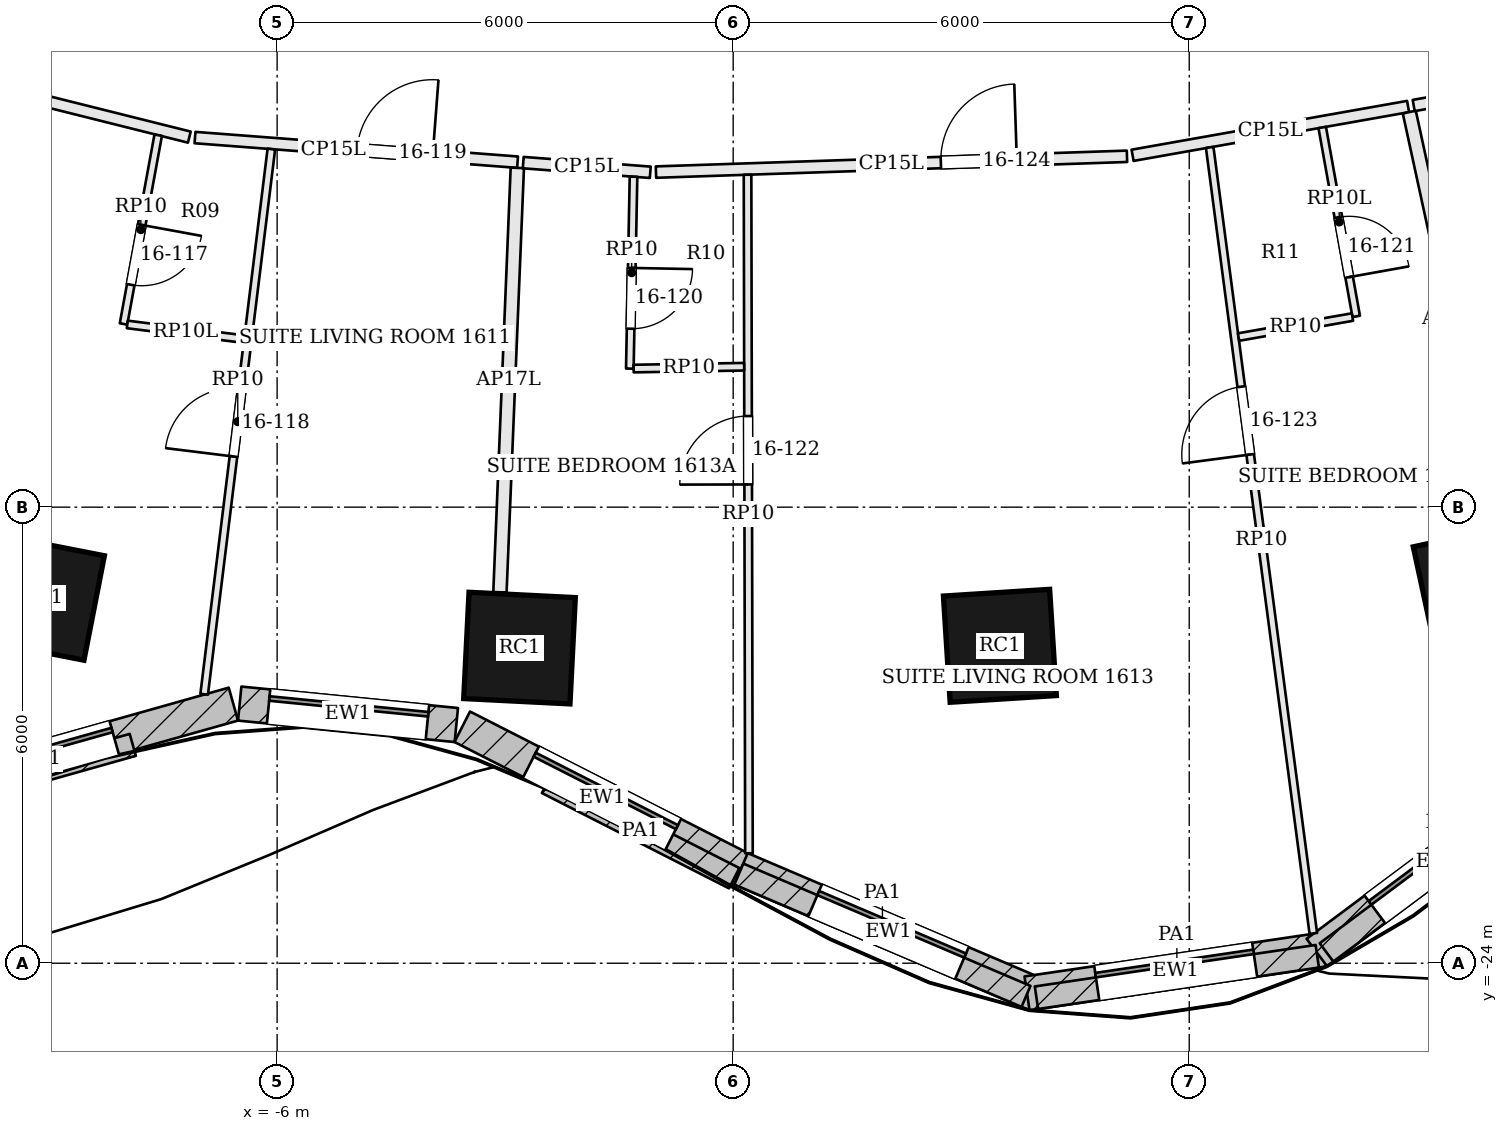
"""IFC4 building model, lengths in metres.
Left out: names, types, materials, properties, quantities, classifications, styles, units other than length and angle.
Written with IfcOpenShell. Run it as: python <this file> out.ifc"""

import sys

from ifc_helpers import new_model, si_unit, direction, frame, frame_2d, origin, origin_2d, place, context, subcontext, project, spatial, rectangle, extrude, element, fill, save


model = new_model("IFC4")
c1 = context("Model", 3, precision=1e-05, world=origin(), true_north=direction((0.0, 1.0)))
c2 = subcontext(c1, "Body", "Model", "MODEL_VIEW")
j1 = project(units=[si_unit("LENGTHUNIT", "METRE"), si_unit("PLANEANGLEUNIT", "RADIAN")], contexts=[c1])
p1 = place(None, origin())
s1 = spatial("IfcSite", under=j1, at=p1, CompositionType="ELEMENT")
p2 = place(p1, origin())
s2 = spatial("IfcBuilding", under=s1, at=p2, CompositionType="ELEMENT")
p3 = place(p2, frame((0.0, 0.0, 73.5)))
s3 = spatial("IfcBuildingStorey", under=s2, at=p3, CompositionType="ELEMENT", Elevation=73.5)
for number, where, z_axis, x_axis in (
    (1, (-9.094, -19.192, 0.0), (0.0, 0.0, 1.0), (0.981, -0.192, 0.0)),
    (2, (-2.811, -19.854, 0.0), (0.0, 0.0, 1.0), (0.999, -0.05, 0.0)),
    (3, (3.509, -19.824, 0.0), (0.0, 0.0, 1.0), (0.998, 0.063, 0.0)),
    (4, (9.78, -19.058, 0.0), (0.0, 0.0, 1.0), (0.977, 0.211, 0.0)),
):
    element("IfcColumn", number, at=place(p3, frame(where, z_axis=z_axis, x_axis=x_axis)), inside=s3, PredefinedType="COLUMN", context=c2, shape_type="SweptSolid", body=[
        extrude(rectangle(XDim=1.4, YDim=1.4, at=origin_2d()), origin(), (0.0, 0.0, 1.0), 2.8),
    ])
p4 = place(p3, frame((-11.732, -22.044, 0.0), z_axis=(0.0, 0.0, 1.0), x_axis=(0.962535416232, 0.271155992925, 0.0)))
e5 = element("IfcWall", 5, at=p4, inside=s3, PredefinedType="SOLIDWALL", context=c2, shape_type="SweptSolid", body=[
    extrude(rectangle(XDim=5.357, YDim=0.45, at=frame_2d((2.679, 0.0))), origin(), (0.0, 0.0, 1.0), 3.3),
])
p5 = place(p4, frame((1.629, 0.0, 0.9)))
e6 = element("IfcOpeningElement", 6, at=p5, cuts=e5, PredefinedType="OPENING", context=c2, shape_type="SweptSolid", body=[
    extrude(rectangle(XDim=2.1, YDim=1.8, at=frame_2d((1.05, 0.9))), frame((0.0, 0.235, 0.0), z_axis=(0.0, -1.0, 0.0), x_axis=(1.0, 0.0, 0.0)), (0.0, 0.0, 1.0), 0.47),
])
p6 = place(p3, frame((-6.492, -20.584, 0.0), z_axis=(0.0, 0.0, 1.0), x_axis=(0.995123748575, -0.098634299418, 0.0)))
e7 = element("IfcWall", 7, at=p6, inside=s3, PredefinedType="SOLIDWALL", context=c2, shape_type="SweptSolid", body=[
    extrude(rectangle(XDim=2.864, YDim=0.45, at=frame_2d((1.432, 0.0))), origin(), (0.0, 0.0, 1.0), 3.3),
])
p7 = place(p6, frame((0.382, 0.0, 0.9)))
e8 = element("IfcOpeningElement", 8, at=p7, cuts=e7, PredefinedType="OPENING", context=c2, shape_type="SweptSolid", body=[
    extrude(rectangle(XDim=2.1, YDim=1.8, at=frame_2d((1.05, 0.9))), frame((0.0, 0.235, 0.0), z_axis=(0.0, -1.0, 0.0), x_axis=(1.0, 0.0, 0.0)), (0.0, 0.0, 1.0), 0.47),
])
p8 = place(p3, frame((-3.564, -20.889, 0.0), z_axis=(0.0, 0.0, 1.0), x_axis=(0.891033634447, -0.453937288933, 0.0)))
e9 = element("IfcWall", 9, at=p8, inside=s3, PredefinedType="SOLIDWALL", context=c2, shape_type="SweptSolid", body=[
    extrude(rectangle(XDim=4.132, YDim=0.45, at=frame_2d((2.066, 0.0))), origin(), (0.0, 0.0, 1.0), 3.3),
])
p9 = place(p8, frame((1.016, 0.0, 0.9)))
e10 = element("IfcOpeningElement", 10, at=p9, cuts=e9, PredefinedType="OPENING", context=c2, shape_type="SweptSolid", body=[
    extrude(rectangle(XDim=2.1, YDim=1.8, at=frame_2d((1.05, 0.9))), frame((0.0, 0.235, 0.0), z_axis=(0.0, -1.0, 0.0), x_axis=(1.0, 0.0, 0.0)), (0.0, 0.0, 1.0), 0.47),
])
p10 = place(p3, frame((0.103, -22.758, 0.0), z_axis=(0.0, 0.0, 1.0), x_axis=(0.920037498786, -0.391830321475, 0.0)))
e11 = element("IfcWall", 11, at=p10, inside=s3, PredefinedType="SOLIDWALL", context=c2, shape_type="SweptSolid", body=[
    extrude(rectangle(XDim=4.219, YDim=0.45, at=frame_2d((2.11, 0.0))), origin(), (0.0, 0.0, 1.0), 3.3),
])
p11 = place(p10, frame((1.06, 0.0, 0.9)))
e12 = element("IfcOpeningElement", 12, at=p11, cuts=e11, PredefinedType="OPENING", context=c2, shape_type="SweptSolid", body=[
    extrude(rectangle(XDim=2.1, YDim=1.8, at=frame_2d((1.05, 0.9))), frame((0.0, 0.235, 0.0), z_axis=(0.0, -1.0, 0.0), x_axis=(1.0, 0.0, 0.0)), (0.0, 0.0, 1.0), 0.47),
])
p12 = place(p3, frame((3.866, -24.396, 0.0), z_axis=(0.0, 0.0, 1.0), x_axis=(0.989255112942, 0.146199594798, 0.0)))
e13 = element("IfcWall", 13, at=p12, inside=s3, PredefinedType="SOLIDWALL", context=c2, shape_type="SweptSolid", body=[
    extrude(rectangle(XDim=3.954, YDim=0.45, at=frame_2d((1.977, 0.0))), origin(), (0.0, 0.0, 1.0), 3.3),
])
p13 = place(p12, frame((0.927, 0.0, 0.9)))
e14 = element("IfcOpeningElement", 14, at=p13, cuts=e13, PredefinedType="OPENING", context=c2, shape_type="SweptSolid", body=[
    extrude(rectangle(XDim=2.1, YDim=1.8, at=frame_2d((1.05, 0.9))), frame((0.0, 0.235, 0.0), z_axis=(0.0, -1.0, 0.0), x_axis=(1.0, 0.0, 0.0)), (0.0, 0.0, 1.0), 0.47),
])
p14 = place(p3, frame((7.678, -23.859, 0.0), z_axis=(0.0, 0.0, 1.0), x_axis=(0.801665619573, 0.597772728046, 0.0)))
e15 = element("IfcWall", 15, at=p14, inside=s3, PredefinedType="SOLIDWALL", context=c2, shape_type="SweptSolid", body=[
    extrude(rectangle(XDim=4.003, YDim=0.45, at=frame_2d((2.001, 0.0))), origin(), (0.0, 0.0, 1.0), 3.3),
])
p15 = place(p14, frame((0.951, 0.0, 0.9)))
e16 = element("IfcOpeningElement", 16, at=p15, cuts=e15, PredefinedType="OPENING", context=c2, shape_type="SweptSolid", body=[
    extrude(rectangle(XDim=2.1, YDim=1.8, at=frame_2d((1.05, 0.9))), frame((0.0, 0.235, 0.0), z_axis=(0.0, -1.0, 0.0), x_axis=(1.0, 0.0, 0.0)), (0.0, 0.0, 1.0), 0.47),
])
p16 = place(p3, frame((-11.314, -22.089, 3.6), z_axis=(0.0, 0.0, 1.0), x_axis=(0.962527541074, 0.271183946195, 0.0)))
e17 = element("IfcWall", 17, at=p16, inside=s3, PredefinedType="PARAPET", context=c2, shape_type="SweptSolid", body=[
    extrude(rectangle(XDim=3.548, YDim=0.3, at=frame_2d((1.774, 0.0))), origin(), (0.0, 0.0, 1.0), 1.1),
])
p17 = place(p3, frame((-2.448, -21.627, 3.6), z_axis=(0.0, 0.0, 1.0), x_axis=(0.891061751317, -0.453882094095, 0.0)))
e18 = element("IfcWall", 18, at=p17, inside=s3, PredefinedType="PARAPET", context=c2, shape_type="SweptSolid", body=[
    extrude(rectangle(XDim=2.763, YDim=0.3, at=frame_2d((1.381, 0.0))), origin(), (0.0, 0.0, 1.0), 1.1),
])
p18 = place(p3, frame((0.075, -22.827, 3.6), z_axis=(0.0, 0.0, 1.0), x_axis=(0.920031521407, -0.391844356367, 0.0)))
e19 = element("IfcWall", 19, at=p18, inside=s3, PredefinedType="PARAPET", context=c2, shape_type="SweptSolid", body=[
    extrude(rectangle(XDim=4.106, YDim=0.3, at=frame_2d((2.053, 0.0))), origin(), (0.0, 0.0, 1.0), 1.1),
])
p19 = place(p3, frame((3.99, -24.454, 3.6), z_axis=(0.0, 0.0, 1.0), x_axis=(0.989258150551, 0.146179039429, 0.0)))
e20 = element("IfcWall", 20, at=p19, inside=s3, PredefinedType="PARAPET", context=c2, shape_type="SweptSolid", body=[
    extrude(rectangle(XDim=3.734, YDim=0.3, at=frame_2d((1.867, 0.0))), origin(), (0.0, 0.0, 1.0), 1.1),
])
p20 = place(p3, frame((7.806, -23.858, 3.6), z_axis=(0.0, 0.0, 1.0), x_axis=(0.801649538596, 0.597794293439, 0.0)))
e21 = element("IfcWall", 21, at=p20, inside=s3, PredefinedType="PARAPET", context=c2, shape_type="SweptSolid", body=[
    extrude(rectangle(XDim=3.865, YDim=0.3, at=frame_2d((1.932, 0.0))), origin(), (0.0, 0.0, 1.0), 1.1),
])
p21 = place(p3, frame((-11.898, -11.945, 0.0), z_axis=(0.0, 0.0, 1.0), x_axis=(0.970083727867, -0.24277059321, 0.0)))
e22 = element("IfcWall", 22, at=p21, inside=s3, PredefinedType="PARTITIONING", context=c2, shape_type="SweptSolid", body=[
    extrude(rectangle(XDim=4.889, YDim=0.15, at=frame_2d((2.445, 0.0))), origin(), (0.0, 0.0, 1.0), 2.58),
])
p22 = place(p3, frame((-7.08, -13.137, 0.0), z_axis=(0.0, 0.0, 1.0), x_axis=(0.997102544245, -0.07606915446, 0.0)))
e23 = element("IfcWall", 23, at=p22, inside=s3, PredefinedType="PARTITIONING", context=c2, shape_type="SweptSolid", body=[
    extrude(rectangle(XDim=4.256, YDim=0.15, at=frame_2d((2.128, 0.0))), origin(), (0.0, 0.0, 1.0), 2.58),
])
p23 = place(p22, frame((2.136, 0.0, 0.0)))
e24 = element("IfcOpeningElement", 24, at=p23, cuts=e23, PredefinedType="OPENING", context=c2, shape_type="SweptSolid", body=[
    extrude(rectangle(XDim=1.0, YDim=2.1, at=frame_2d((0.5, 1.05))), frame((0.0, 0.085, 0.0), z_axis=(0.0, -1.0, 0.0), x_axis=(1.0, 0.0, 0.0)), (0.0, 0.0, 1.0), 0.17),
])
p24 = place(p3, frame((-3.069, -19.12, 0.0), z_axis=(0.0, 0.0, 1.0), x_axis=(0.04093278692, 0.999161902274, 0.0)))
e25 = element("IfcWall", 25, at=p24, inside=s3, PredefinedType="PARTITIONING", context=c2, shape_type="SweptSolid", body=[
    extrude(rectangle(XDim=5.589, YDim=0.175, at=frame_2d((2.794, 0.0))), origin(), (0.0, 0.0, 1.0), 2.28),
])
p25 = place(p3, frame((-2.762, -13.467, 0.0), z_axis=(0.0, 0.0, 1.0), x_axis=(0.9971056667, -0.076028214726, 0.0)))
e26 = element("IfcWall", 26, at=p25, inside=s3, PredefinedType="PARTITIONING", context=c2, shape_type="SweptSolid", body=[
    extrude(rectangle(XDim=1.676, YDim=0.15, at=frame_2d((0.838, 0.0))), origin(), (0.0, 0.0, 1.0), 2.58),
])
p26 = place(p3, frame((-1.016, -13.592, 0.0), z_axis=(0.0, 0.0, 1.0), x_axis=(0.999437056395, 0.033549520194, 0.0)))
e27 = element("IfcWall", 27, at=p26, inside=s3, PredefinedType="PARTITIONING", context=c2, shape_type="SweptSolid", body=[
    extrude(rectangle(XDim=6.2, YDim=0.15, at=frame_2d((3.1, 0.0))), origin(), (0.0, 0.0, 1.0), 2.58),
])
p27 = place(p26, frame((3.75, 0.0, 0.0)))
e28 = element("IfcOpeningElement", 28, at=p27, cuts=e27, PredefinedType="OPENING", context=c2, shape_type="SweptSolid", body=[
    extrude(rectangle(XDim=1.0, YDim=2.1, at=frame_2d((0.5, 1.05))), frame((0.0, 0.085, 0.0), z_axis=(0.0, -1.0, 0.0), x_axis=(1.0, 0.0, 0.0)), (0.0, 0.0, 1.0), 0.17),
])
p28 = place(p3, frame((5.255, -13.371, 0.0), z_axis=(0.0, 0.0, 1.0), x_axis=(0.984677871603, 0.174383167696, 0.0)))
e29 = element("IfcWall", 29, at=p28, inside=s3, PredefinedType="PARTITIONING", context=c2, shape_type="SweptSolid", body=[
    extrude(rectangle(XDim=3.681, YDim=0.15, at=frame_2d((1.84, 0.0))), origin(), (0.0, 0.0, 1.0), 2.58),
])
p29 = place(p3, frame((10.081, -18.256, 0.0), z_axis=(0.0, 0.0, 1.0), x_axis=(-0.212542235069, 0.977151880882, 0.0)))
e30 = element("IfcWall", 30, at=p29, inside=s3, PredefinedType="PARTITIONING", context=c2, shape_type="SweptSolid", body=[
    extrude(rectangle(XDim=5.581, YDim=0.175, at=frame_2d((2.791, 0.0))), origin(), (0.0, 0.0, 1.0), 2.28),
])
p30 = place(p3, frame((8.953, -12.716, 0.0), z_axis=(0.0, 0.0, 1.0), x_axis=(0.984678178819, 0.17438143295, 0.0)))
e31 = element("IfcWall", 31, at=p30, inside=s3, PredefinedType="PARTITIONING", context=c2, shape_type="SweptSolid", body=[
    extrude(rectangle(XDim=1.121, YDim=0.15, at=frame_2d((0.561, 0.0))), origin(), (0.0, 0.0, 1.0), 2.684),
])
p31 = place(p3, frame((-6.96, -20.462, 0.0), z_axis=(0.0, 0.0, 1.0), x_axis=(0.122329787854, 0.992489507755, 0.0)))
e32 = element("IfcWall", 32, at=p31, inside=s3, PredefinedType="PARTITIONING", context=c2, shape_type="SweptSolid", body=[
    extrude(rectangle(XDim=7.227, YDim=0.1, at=frame_2d((3.613, 0.0))), origin(), (0.0, 0.0, 1.0), 2.784),
])
p32 = place(p31, frame((3.152, 0.0, 0.0)))
e33 = element("IfcOpeningElement", 33, at=p32, cuts=e32, PredefinedType="OPENING", context=c2, shape_type="SweptSolid", body=[
    extrude(rectangle(XDim=0.9, YDim=2.4, at=frame_2d((0.45, 1.2))), frame((0.0, 0.06, 0.0), z_axis=(0.0, -1.0, 0.0), x_axis=(1.0, 0.0, 0.0)), (0.0, 0.0, 1.0), 0.12),
])
p33 = place(p3, frame((-7.565, -13.106, 0.0), z_axis=(0.0, 0.0, 1.0), x_axis=(-0.180527437527, -0.98356994886, 0.0)))
e34 = element("IfcWall", 34, at=p33, inside=s3, PredefinedType="PARTITIONING", context=c2, shape_type="SweptSolid", body=[
    extrude(rectangle(XDim=2.525, YDim=0.1, at=frame_2d((1.262, 0.0))), origin(), (0.0, 0.0, 1.0), 2.784),
])
p34 = place(p33, frame((1.2, 0.0, 0.0)))
e35 = element("IfcOpeningElement", 35, at=p34, cuts=e34, PredefinedType="OPENING", context=c2, shape_type="SweptSolid", body=[
    extrude(rectangle(XDim=0.8, YDim=2.1, at=frame_2d((0.4, 1.05))), frame((0.0, 0.06, 0.0), z_axis=(0.0, -1.0, 0.0), x_axis=(1.0, 0.0, 0.0)), (0.0, 0.0, 1.0), 0.12),
])
p35 = place(p3, frame((-7.971, -15.596, 0.0), z_axis=(0.0, 0.0, 1.0), x_axis=(0.992197649384, -0.124674875403, 0.0)))
e36 = element("IfcWall", 36, at=p35, inside=s3, PredefinedType="PARTITIONING", context=c2, shape_type="SweptSolid", body=[
    extrude(rectangle(XDim=1.549, YDim=0.1, at=frame_2d((0.774, 0.0))), origin(), (0.0, 0.0, 1.0), 2.58),
])
p36 = place(p3, frame((0.208, -22.553, 0.0), z_axis=(0.0, 0.0, 1.0), x_axis=(-0.002051193584, 0.9999978963, 0.0)))
e37 = element("IfcWall", 37, at=p36, inside=s3, PredefinedType="PARTITIONING", context=c2, shape_type="SweptSolid", body=[
    extrude(rectangle(XDim=8.927, YDim=0.1, at=frame_2d((4.463, 0.0))), origin(), (0.0, 0.0, 1.0), 2.784),
])
p37 = place(p36, frame((4.852, 0.0, 0.0)))
e38 = element("IfcOpeningElement", 38, at=p37, cuts=e37, PredefinedType="OPENING", context=c2, shape_type="SweptSolid", body=[
    extrude(rectangle(XDim=0.9, YDim=2.4, at=frame_2d((0.45, 1.2))), frame((0.0, 0.06, 0.0), z_axis=(0.0, -1.0, 0.0), x_axis=(1.0, 0.0, 0.0)), (0.0, 0.0, 1.0), 0.12),
])
p38 = place(p3, frame((7.633, -23.608, 0.0), z_axis=(0.0, 0.0, 1.0), x_axis=(-0.13070700248, 0.991421040478, 0.0)))
e39 = element("IfcWall", 39, at=p38, inside=s3, PredefinedType="PARTITIONING", context=c2, shape_type="SweptSolid", body=[
    extrude(rectangle(XDim=10.43, YDim=0.1, at=frame_2d((5.215, 0.0))), origin(), (0.0, 0.0, 1.0), 2.784),
])
p39 = place(p38, frame((6.355, 0.0, 0.0)))
e40 = element("IfcOpeningElement", 40, at=p39, cuts=e39, PredefinedType="OPENING", context=c2, shape_type="SweptSolid", body=[
    extrude(rectangle(XDim=0.9, YDim=2.4, at=frame_2d((0.45, 1.2))), frame((0.0, 0.06, 0.0), z_axis=(0.0, -1.0, 0.0), x_axis=(1.0, 0.0, 0.0)), (0.0, 0.0, 1.0), 0.12),
])
p40 = place(p3, frame((-1.311, -13.653, 0.0), z_axis=(0.0, 0.0, 1.0), x_axis=(-0.019242084713, -0.999814853948, 0.0)))
e41 = element("IfcWall", 41, at=p40, inside=s3, PredefinedType="PARTITIONING", context=c2, shape_type="SweptSolid", body=[
    extrude(rectangle(XDim=2.525, YDim=0.1, at=frame_2d((1.262, 0.0))), origin(), (0.0, 0.0, 1.0), 2.784),
])
p41 = place(p40, frame((1.2, 0.0, 0.0)))
e42 = element("IfcOpeningElement", 42, at=p41, cuts=e41, PredefinedType="OPENING", context=c2, shape_type="SweptSolid", body=[
    extrude(rectangle(XDim=0.8, YDim=2.1, at=frame_2d((0.4, 1.05))), frame((0.0, 0.06, 0.0), z_axis=(0.0, -1.0, 0.0), x_axis=(1.0, 0.0, 0.0)), (0.0, 0.0, 1.0), 0.12),
])
p42 = place(p3, frame((-1.31, -16.177, 0.0), z_axis=(0.0, 0.0, 1.0), x_axis=(0.999861884941, 0.016619598155, 0.0)))
e43 = element("IfcWall", 43, at=p42, inside=s3, PredefinedType="PARTITIONING", context=c2, shape_type="SweptSolid", body=[
    extrude(rectangle(XDim=1.454, YDim=0.1, at=frame_2d((0.727, 0.0))), origin(), (0.0, 0.0, 1.0), 2.784),
])
p43 = place(p3, frame((7.75, -13.005, 0.0), z_axis=(0.0, 0.0, 1.0), x_axis=(0.176945076227, -0.984220727276, 0.0)))
e44 = element("IfcWall", 44, at=p43, inside=s3, PredefinedType="PARTITIONING", context=c2, shape_type="SweptSolid", body=[
    extrude(rectangle(XDim=2.525, YDim=0.1, at=frame_2d((1.262, 0.0))), origin(), (0.0, 0.0, 1.0), 2.58),
])
p44 = place(p43, frame((1.2, 0.0, 0.0)))
e45 = element("IfcOpeningElement", 45, at=p44, cuts=e44, PredefinedType="OPENING", context=c2, shape_type="SweptSolid", body=[
    extrude(rectangle(XDim=0.8, YDim=2.1, at=frame_2d((0.4, 1.05))), frame((0.0, 0.06, 0.0), z_axis=(0.0, -1.0, 0.0), x_axis=(1.0, 0.0, 0.0)), (0.0, 0.0, 1.0), 0.12),
])
p45 = place(p3, frame((8.147, -15.499, 0.0), z_axis=(0.0, 0.0, 1.0), x_axis=(-0.984907650176, -0.173080676635, 0.0)))
e46 = element("IfcWall", 46, at=p45, inside=s3, PredefinedType="PARTITIONING", context=c2, shape_type="SweptSolid", body=[
    extrude(rectangle(XDim=1.522, YDim=0.1, at=frame_2d((0.761, 0.0))), origin(), (0.0, 0.0, 1.0), 2.784),
])
p46 = place(p5, origin())
e47 = element("IfcWindow", 47, at=p46, inside=s3, PartitioningType="SINGLE_PANEL", PredefinedType="WINDOW", context=c2, shape_type="SweptSolid", body=[
    extrude(rectangle(XDim=2.1, YDim=1.8, at=frame_2d((1.05, 0.9))), frame((0.0, 0.135, 0.0), z_axis=(0.0, -1.0, 0.0), x_axis=(1.0, 0.0, 0.0)), (0.0, 0.0, 1.0), 0.06),
])
fill(e6, e47)
p47 = place(p7, origin())
e48 = element("IfcWindow", 48, at=p47, inside=s3, PartitioningType="SINGLE_PANEL", PredefinedType="WINDOW", context=c2, shape_type="SweptSolid", body=[
    extrude(rectangle(XDim=2.1, YDim=1.8, at=frame_2d((1.05, 0.9))), frame((0.0, 0.135, 0.0), z_axis=(0.0, -1.0, 0.0), x_axis=(1.0, 0.0, 0.0)), (0.0, 0.0, 1.0), 0.06),
])
fill(e8, e48)
p48 = place(p9, origin())
e49 = element("IfcWindow", 49, at=p48, inside=s3, PartitioningType="SINGLE_PANEL", PredefinedType="WINDOW", context=c2, shape_type="SweptSolid", body=[
    extrude(rectangle(XDim=2.1, YDim=1.8, at=frame_2d((1.05, 0.9))), frame((0.0, 0.135, 0.0), z_axis=(0.0, -1.0, 0.0), x_axis=(1.0, 0.0, 0.0)), (0.0, 0.0, 1.0), 0.06),
])
fill(e10, e49)
p49 = place(p11, origin())
e50 = element("IfcWindow", 50, at=p49, inside=s3, PartitioningType="SINGLE_PANEL", PredefinedType="WINDOW", context=c2, shape_type="SweptSolid", body=[
    extrude(rectangle(XDim=2.1, YDim=1.8, at=frame_2d((1.05, 0.9))), frame((0.0, 0.135, 0.0), z_axis=(0.0, -1.0, 0.0), x_axis=(1.0, 0.0, 0.0)), (0.0, 0.0, 1.0), 0.06),
])
fill(e12, e50)
p50 = place(p13, origin())
e51 = element("IfcWindow", 51, at=p50, inside=s3, PartitioningType="SINGLE_PANEL", PredefinedType="WINDOW", context=c2, shape_type="SweptSolid", body=[
    extrude(rectangle(XDim=2.1, YDim=1.8, at=frame_2d((1.05, 0.9))), frame((0.0, 0.135, 0.0), z_axis=(0.0, -1.0, 0.0), x_axis=(1.0, 0.0, 0.0)), (0.0, 0.0, 1.0), 0.06),
])
fill(e14, e51)
p51 = place(p15, origin())
e52 = element("IfcWindow", 52, at=p51, inside=s3, PartitioningType="SINGLE_PANEL", PredefinedType="WINDOW", context=c2, shape_type="SweptSolid", body=[
    extrude(rectangle(XDim=2.1, YDim=1.8, at=frame_2d((1.05, 0.9))), frame((0.0, 0.135, 0.0), z_axis=(0.0, -1.0, 0.0), x_axis=(1.0, 0.0, 0.0)), (0.0, 0.0, 1.0), 0.06),
])
fill(e16, e52)
p52 = place(p34, origin())
e53 = element("IfcDoor", 53, at=p52, inside=s3, OperationType="SINGLE_SWING_LEFT", PredefinedType="DOOR", context=c2, shape_type="SweptSolid", body=[
    extrude(rectangle(XDim=0.8, YDim=2.1, at=frame_2d((0.4, 1.05))), frame((0.0, 0.025, 0.0), z_axis=(0.0, -1.0, 0.0), x_axis=(1.0, 0.0, 0.0)), (0.0, 0.0, 1.0), 0.05),
])
fill(e35, e53)
p53 = place(p32, origin())
e54 = element("IfcDoor", 54, at=p53, inside=s3, OperationType="SINGLE_SWING_LEFT", PredefinedType="DOOR", context=c2, shape_type="SweptSolid", body=[
    extrude(rectangle(XDim=0.9, YDim=2.4, at=frame_2d((0.45, 1.2))), frame((0.0, 0.025, 0.0), z_axis=(0.0, -1.0, 0.0), x_axis=(1.0, 0.0, 0.0)), (0.0, 0.0, 1.0), 0.05),
])
fill(e33, e54)
p54 = place(p23, origin())
e55 = element("IfcDoor", 55, at=p54, inside=s3, OperationType="SINGLE_SWING_RIGHT", PredefinedType="DOOR", context=c2, shape_type="SweptSolid", body=[
    extrude(rectangle(XDim=1.0, YDim=2.1, at=frame_2d((0.5, 1.05))), frame((0.0, 0.025, 0.0), z_axis=(0.0, -1.0, 0.0), x_axis=(1.0, 0.0, 0.0)), (0.0, 0.0, 1.0), 0.05),
])
fill(e24, e55)
p55 = place(p41, origin())
e56 = element("IfcDoor", 56, at=p55, inside=s3, OperationType="SINGLE_SWING_LEFT", PredefinedType="DOOR", context=c2, shape_type="SweptSolid", body=[
    extrude(rectangle(XDim=0.8, YDim=2.1, at=frame_2d((0.4, 1.05))), frame((0.0, 0.025, 0.0), z_axis=(0.0, -1.0, 0.0), x_axis=(1.0, 0.0, 0.0)), (0.0, 0.0, 1.0), 0.05),
])
fill(e42, e56)
p56 = place(p44, origin())
e57 = element("IfcDoor", 57, at=p56, inside=s3, OperationType="SINGLE_SWING_RIGHT", PredefinedType="DOOR", context=c2, shape_type="SweptSolid", body=[
    extrude(rectangle(XDim=0.8, YDim=2.1, at=frame_2d((0.4, 1.05))), frame((0.0, 0.025, 0.0), z_axis=(0.0, -1.0, 0.0), x_axis=(1.0, 0.0, 0.0)), (0.0, 0.0, 1.0), 0.05),
])
fill(e45, e57)
p57 = place(p37, origin())
e58 = element("IfcDoor", 58, at=p57, inside=s3, OperationType="SINGLE_SWING_LEFT", PredefinedType="DOOR", context=c2, shape_type="SweptSolid", body=[
    extrude(rectangle(XDim=0.9, YDim=2.4, at=frame_2d((0.45, 1.2))), frame((0.0, 0.025, 0.0), z_axis=(0.0, -1.0, 0.0), x_axis=(1.0, 0.0, 0.0)), (0.0, 0.0, 1.0), 0.05),
])
fill(e38, e58)
p58 = place(p39, origin())
e59 = element("IfcDoor", 59, at=p58, inside=s3, OperationType="SINGLE_SWING_LEFT", PredefinedType="DOOR", context=c2, shape_type="SweptSolid", body=[
    extrude(rectangle(XDim=0.9, YDim=2.4, at=frame_2d((0.45, 1.2))), frame((0.0, 0.025, 0.0), z_axis=(0.0, -1.0, 0.0), x_axis=(1.0, 0.0, 0.0)), (0.0, 0.0, 1.0), 0.05),
])
fill(e40, e59)
p59 = place(p27, origin())
e60 = element("IfcDoor", 60, at=p59, inside=s3, OperationType="SINGLE_SWING_RIGHT", PredefinedType="DOOR", context=c2, shape_type="SweptSolid", body=[
    extrude(rectangle(XDim=1.0, YDim=2.1, at=frame_2d((0.5, 1.05))), frame((0.0, 0.025, 0.0), z_axis=(0.0, -1.0, 0.0), x_axis=(1.0, 0.0, 0.0)), (0.0, 0.0, 1.0), 0.05),
])
fill(e28, e60)
save(model, sys.argv[1])
